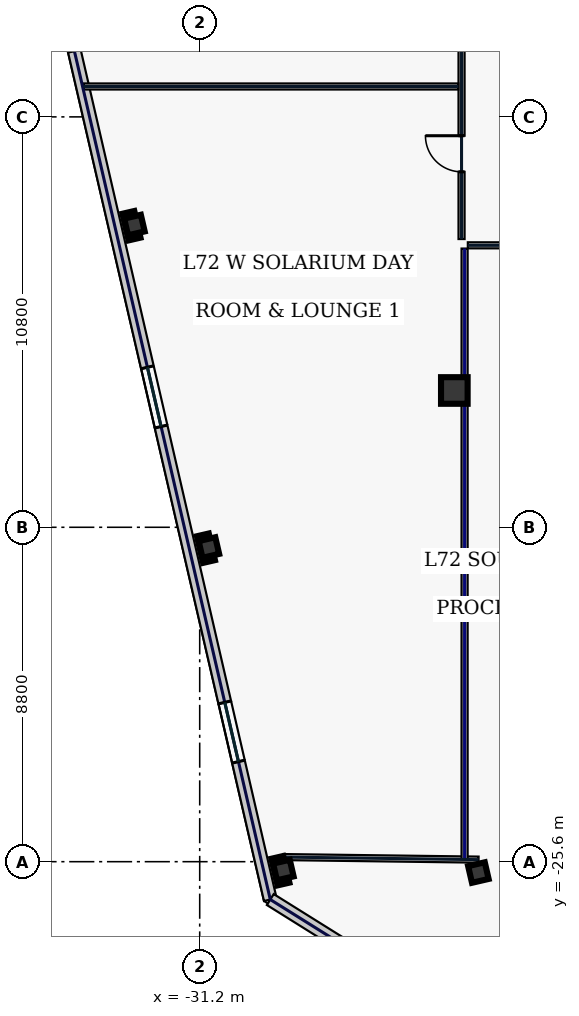
"""IFC4 building model, lengths in metres.
Left out: names, types, materials, properties, quantities, classifications, styles, units other than length and angle.
Written with IfcOpenShell. Run it as: python <this file> out.ifc"""

import sys

from ifc_helpers import new_model, si_unit, direction, frame, frame_2d, origin, origin_2d, place, context, subcontext, project, spatial, rectangle, hollow_rectangle, extrude, element, fill, save


model = new_model("IFC4")
c1 = context("Model", 3, precision=1e-05, world=origin(), true_north=direction((0.0, 1.0)))
c2 = subcontext(c1, "Body", "Model", "MODEL_VIEW")
j1 = project(units=[si_unit("LENGTHUNIT", "METRE"), si_unit("PLANEANGLEUNIT", "RADIAN")], contexts=[c1])
p1 = place(None, origin())
s1 = spatial("IfcSite", under=j1, at=p1, CompositionType="ELEMENT")
p2 = place(p1, origin())
s2 = spatial("IfcBuilding", under=s1, at=p2, CompositionType="ELEMENT")
p3 = place(p2, frame((0.0, 0.0, 309.0)))
s3 = spatial("IfcBuildingStorey", under=s2, at=p3, CompositionType="ELEMENT", Elevation=309.0)
p4 = place(p3, frame((-24.5, -13.2, 0.0), z_axis=(0.0, 0.0, 1.0), x_axis=(1.0, 0.0, 0.0)))
e1 = element("IfcColumn", 1, at=p4, inside=s3, PredefinedType="COLUMN", context=c2, shape_type="SweptSolid", body=[
    extrude(hollow_rectangle(XDim=0.7, YDim=0.7, WallThickness=0.032, at=origin_2d()), origin(), (0.0, 0.0, 1.0), 3.74),
])
for number, where, z_axis, x_axis in (
    (2, (-23.867, -25.886, 0.0), (0.0, 0.0, 1.0), (0.974, 0.225, 0.0)),
    (3, (-32.917, -8.845, 0.0), (0.0, 0.0, 1.0), (0.974, 0.225, 0.0)),
    (4, (-30.958, -17.332, 0.0), (0.0, 0.0, 1.0), (0.974, 0.225, 0.0)),
    (5, (-28.999, -25.819, 0.0), (0.0, 0.0, 1.0), (0.974, 0.225, 0.0)),
):
    element("IfcColumn", number, at=place(p3, frame(where, z_axis=z_axis, x_axis=x_axis)), inside=s3, PredefinedType="COLUMN", context=c2, shape_type="SweptSolid", body=[
        extrude(hollow_rectangle(XDim=0.45, YDim=0.45, WallThickness=0.022, at=origin_2d()), origin(), (0.0, 0.0, 1.0), 3.74),
    ])
p5 = place(p3, frame((-24.03, -29.916, 0.0), z_axis=(0.0, 0.0, 1.0), x_axis=(0.974370978061, 0.224947098473, 0.0)))
e6 = element("IfcWall", 6, at=p5, inside=s3, PredefinedType="STANDARD", context=c2, shape_type="SweptSolid", body=[
    extrude(rectangle(XDim=17.506, YDim=0.34, at=frame_2d((8.753, 0.0))), origin(), (0.0, 0.0, 1.0), 3.74),
])
p6 = place(p5, frame((2.35, 0.0, 0.9)))
e7 = element("IfcOpeningElement", 7, at=p6, cuts=e6, PredefinedType="OPENING", context=c2, shape_type="SweptSolid", body=[
    extrude(rectangle(XDim=1.5, YDim=2.0, at=frame_2d((0.75, 1.0))), frame((0.0, 0.18, 0.0), z_axis=(0.0, -1.0, 0.0), x_axis=(1.0, 0.0, 0.0)), (0.0, 0.0, 1.0), 0.36),
])
p7 = place(p5, frame((5.817, 0.0, 0.9)))
e8 = element("IfcOpeningElement", 8, at=p7, cuts=e6, PredefinedType="OPENING", context=c2, shape_type="SweptSolid", body=[
    extrude(rectangle(XDim=1.5, YDim=2.0, at=frame_2d((0.75, 1.0))), frame((0.0, 0.18, 0.0), z_axis=(0.0, -1.0, 0.0), x_axis=(1.0, 0.0, 0.0)), (0.0, 0.0, 1.0), 0.36),
])
p8 = place(p5, frame((13.353, 0.0, 0.9)))
e9 = element("IfcOpeningElement", 9, at=p8, cuts=e6, PredefinedType="OPENING", context=c2, shape_type="SweptSolid", body=[
    extrude(rectangle(XDim=0.85, YDim=1.85, at=frame_2d((0.425, 0.925))), frame((0.0, 0.18, 0.0), z_axis=(0.0, -1.0, 0.0), x_axis=(1.0, 0.0, 0.0)), (0.0, 0.0, 1.0), 0.36),
])
p9 = place(p3, frame((-37.486, 8.676, 0.0), z_axis=(0.0, 0.0, 1.0), x_axis=(0.224953091034, -0.974369594576, 0.0)))
e10 = element("IfcWall", 10, at=p9, inside=s3, PredefinedType="STANDARD", context=c2, shape_type="SweptSolid", body=[
    extrude(rectangle(XDim=36.2, YDim=0.34, at=frame_2d((18.1, 0.0))), origin(), (0.0, 0.0, 1.0), 3.74),
])
p10 = place(p9, frame((4.825, 0.0, 0.75)))
e11 = element("IfcOpeningElement", 11, at=p10, cuts=e10, PredefinedType="OPENING", context=c2, shape_type="SweptSolid", body=[
    extrude(rectangle(XDim=0.85, YDim=1.85, at=frame_2d((0.425, 0.925))), frame((0.0, 0.18, 0.0), z_axis=(0.0, -1.0, 0.0), x_axis=(1.0, 0.0, 0.0)), (0.0, 0.0, 1.0), 0.36),
])
p11 = place(p9, frame((12.425, 0.0, 0.75)))
e12 = element("IfcOpeningElement", 12, at=p11, cuts=e10, PredefinedType="OPENING", context=c2, shape_type="SweptSolid", body=[
    extrude(rectangle(XDim=0.85, YDim=1.85, at=frame_2d((0.425, 0.925))), frame((0.0, 0.18, 0.0), z_axis=(0.0, -1.0, 0.0), x_axis=(1.0, 0.0, 0.0)), (0.0, 0.0, 1.0), 0.36),
])
p12 = place(p9, frame((21.825, 0.0, 0.58)))
e13 = element("IfcOpeningElement", 13, at=p12, cuts=e10, PredefinedType="OPENING", context=c2, shape_type="SweptSolid", body=[
    extrude(rectangle(XDim=1.6, YDim=2.3, at=frame_2d((0.8, 1.15))), frame((0.0, 0.18, 0.0), z_axis=(0.0, -1.0, 0.0), x_axis=(1.0, 0.0, 0.0)), (0.0, 0.0, 1.0), 0.36),
])
p13 = place(p9, frame((30.875, 0.0, 0.58)))
e14 = element("IfcOpeningElement", 14, at=p13, cuts=e10, PredefinedType="OPENING", context=c2, shape_type="SweptSolid", body=[
    extrude(rectangle(XDim=1.6, YDim=2.3, at=frame_2d((0.8, 1.15))), frame((0.0, 0.18, 0.0), z_axis=(0.0, -1.0, 0.0), x_axis=(1.0, 0.0, 0.0)), (0.0, 0.0, 1.0), 0.36),
])
p14 = place(p3, frame((-29.343, -26.596, 0.0), z_axis=(0.0, 0.0, 1.0), x_axis=(0.848037708252, -0.529935887993, 0.0)))
e15 = element("IfcWall", 15, at=p14, inside=s3, PredefinedType="STANDARD", context=c2, shape_type="SweptSolid", body=[
    extrude(rectangle(XDim=6.265, YDim=0.34, at=frame_2d((3.133, 0.0))), origin(), (0.0, 0.0, 1.0), 3.74),
])
p15 = place(p3, frame((-28.994, -25.479, 0.0), z_axis=(0.0, 0.0, 1.0), x_axis=(0.999915052546, -0.01303409726, 0.0)))
e16 = element("IfcWall", 16, at=p15, inside=s3, PredefinedType="PARTITIONING", context=c2, shape_type="SweptSolid", body=[
    extrude(rectangle(XDim=5.132, YDim=0.16, at=frame_2d((2.566, 0.0))), origin(), (0.0, 0.0, 1.0), 3.74),
])
p16 = place(p3, frame((-24.31, -9.215, 0.0), z_axis=(0.0, 0.0, 1.0), x_axis=(0.0, 1.0, 0.0)))
e17 = element("IfcWall", 17, at=p16, inside=s3, PredefinedType="PARTITIONING", context=c2, shape_type="SweptSolid", body=[
    extrude(rectangle(XDim=18.63, YDim=0.16, at=frame_2d((9.315, 0.0))), origin(), (0.0, 0.0, 1.0), 3.74),
])
p17 = place(p16, frame((1.769, 0.0, 0.0)))
e18 = element("IfcOpeningElement", 18, at=p17, cuts=e17, PredefinedType="OPENING", context=c2, shape_type="SweptSolid", body=[
    extrude(rectangle(XDim=0.95, YDim=2.2, at=frame_2d((0.475, 1.1))), frame((0.0, 0.09, 0.0), z_axis=(0.0, -1.0, 0.0), x_axis=(1.0, 0.0, 0.0)), (0.0, 0.0, 1.0), 0.18),
])
p18 = place(p16, frame((6.85, 0.0, 0.0)))
e19 = element("IfcOpeningElement", 19, at=p18, cuts=e17, PredefinedType="OPENING", context=c2, shape_type="SweptSolid", body=[
    extrude(rectangle(XDim=0.95, YDim=2.2, at=frame_2d((0.475, 1.1))), frame((0.0, 0.09, 0.0), z_axis=(0.0, -1.0, 0.0), x_axis=(1.0, 0.0, 0.0)), (0.0, 0.0, 1.0), 0.18),
])
p19 = place(p16, frame((12.05, 0.0, 0.0)))
e20 = element("IfcOpeningElement", 20, at=p19, cuts=e17, PredefinedType="OPENING", context=c2, shape_type="SweptSolid", body=[
    extrude(rectangle(XDim=0.95, YDim=2.2, at=frame_2d((0.475, 1.1))), frame((0.0, 0.09, 0.0), z_axis=(0.0, -1.0, 0.0), x_axis=(1.0, 0.0, 0.0)), (0.0, 0.0, 1.0), 0.18),
])
p20 = place(p16, frame((15.981, 0.0, 0.0)))
e21 = element("IfcOpeningElement", 21, at=p20, cuts=e17, PredefinedType="OPENING", context=c2, shape_type="SweptSolid", body=[
    extrude(rectangle(XDim=0.95, YDim=2.2, at=frame_2d((0.475, 1.1))), frame((0.0, 0.09, 0.0), z_axis=(0.0, -1.0, 0.0), x_axis=(1.0, 0.0, 0.0)), (0.0, 0.0, 1.0), 0.18),
])
p21 = place(p3, frame((12.535, -9.38, 0.0), z_axis=(0.0, 0.0, 1.0), x_axis=(-1.0, 0.0, 0.0)))
e22 = element("IfcWall", 22, at=p21, inside=s3, PredefinedType="PARTITIONING", context=c2, shape_type="SweptSolid", body=[
    extrude(rectangle(XDim=36.68, YDim=0.16, at=frame_2d((18.34, 0.0))), origin(), (0.0, 0.0, 1.0), 3.74),
])
p22 = place(p21, frame((33.856, 0.0, 0.0)))
e23 = element("IfcOpeningElement", 23, at=p22, cuts=e22, PredefinedType="OPENING", context=c2, shape_type="SweptSolid", body=[
    extrude(rectangle(XDim=1.05, YDim=2.2, at=frame_2d((0.525, 1.1))), frame((0.0, 0.09, 0.0), z_axis=(0.0, -1.0, 0.0), x_axis=(1.0, 0.0, 0.0)), (0.0, 0.0, 1.0), 0.18),
])
p23 = place(p21, frame((28.88, 0.0, 0.0)))
e24 = element("IfcOpeningElement", 24, at=p23, cuts=e22, PredefinedType="OPENING", context=c2, shape_type="SweptSolid", body=[
    extrude(rectangle(XDim=1.15, YDim=2.2, at=frame_2d((0.575, 1.1))), frame((0.0, 0.09, 0.0), z_axis=(0.0, -1.0, 0.0), x_axis=(1.0, 0.0, 0.0)), (0.0, 0.0, 1.0), 0.18),
])
p24 = place(p21, frame((23.64, 0.0, 0.0)))
e25 = element("IfcOpeningElement", 25, at=p24, cuts=e22, PredefinedType="OPENING", context=c2, shape_type="SweptSolid", body=[
    extrude(rectangle(XDim=0.95, YDim=2.2, at=frame_2d((0.475, 1.1))), frame((0.0, 0.09, 0.0), z_axis=(0.0, -1.0, 0.0), x_axis=(1.0, 0.0, 0.0)), (0.0, 0.0, 1.0), 0.18),
])
p25 = place(p21, frame((18.395, 0.0, 0.0)))
e26 = element("IfcOpeningElement", 26, at=p25, cuts=e22, PredefinedType="OPENING", context=c2, shape_type="SweptSolid", body=[
    extrude(rectangle(XDim=0.95, YDim=2.2, at=frame_2d((0.475, 1.1))), frame((0.0, 0.09, 0.0), z_axis=(0.0, -1.0, 0.0), x_axis=(1.0, 0.0, 0.0)), (0.0, 0.0, 1.0), 0.18),
])
p26 = place(p21, frame((12.97, 0.0, 0.0)))
e27 = element("IfcOpeningElement", 27, at=p26, cuts=e22, PredefinedType="OPENING", context=c2, shape_type="SweptSolid", body=[
    extrude(rectangle(XDim=1.3, YDim=2.2, at=frame_2d((0.65, 1.1))), frame((0.0, 0.09, 0.0), z_axis=(0.0, -1.0, 0.0), x_axis=(1.0, 0.0, 0.0)), (0.0, 0.0, 1.0), 0.18),
])
p27 = place(p21, frame((5.32, 0.0, 0.0)))
e28 = element("IfcOpeningElement", 28, at=p27, cuts=e22, PredefinedType="OPENING", context=c2, shape_type="SweptSolid", body=[
    extrude(rectangle(XDim=1.3, YDim=2.2, at=frame_2d((0.65, 1.1))), frame((0.0, 0.09, 0.0), z_axis=(0.0, -1.0, 0.0), x_axis=(1.0, 0.0, 0.0)), (0.0, 0.0, 1.0), 0.18),
])
p28 = place(p3, frame((-24.23, -25.536, 0.0), z_axis=(0.0, 0.0, 1.0), x_axis=(0.0, 1.0, 0.0)))
e29 = element("IfcWall", 29, at=p28, inside=s3, PredefinedType="PARTITIONING", context=c2, shape_type="SweptSolid", body=[
    extrude(rectangle(XDim=16.071, YDim=0.16, at=frame_2d((8.035, 0.0))), origin(), (0.0, 0.0, 1.0), 3.335),
])
p29 = place(p3, frame((-34.262, -5.2, 0.0), z_axis=(0.0, 0.0, 1.0), x_axis=(1.0, 0.0, 0.0)))
e30 = element("IfcWall", 30, at=p29, inside=s3, PredefinedType="PARTITIONING", context=c2, shape_type="SweptSolid", body=[
    extrude(rectangle(XDim=9.867, YDim=0.16, at=frame_2d((4.933, 0.0))), origin(), (0.0, 0.0, 1.0), 3.74),
])
p30 = place(p12, origin())
e31 = element("IfcWindow", 31, at=p30, inside=s3, PartitioningType="SINGLE_PANEL", PredefinedType="WINDOW", context=c2, shape_type="SweptSolid", body=[
    extrude(rectangle(XDim=1.6, YDim=2.3, at=frame_2d((0.8, 1.15))), frame((0.0, 0.03, 0.0), z_axis=(0.0, -1.0, 0.0), x_axis=(1.0, 0.0, 0.0)), (0.0, 0.0, 1.0), 0.06),
])
fill(e13, e31)
p31 = place(p13, origin())
e32 = element("IfcWindow", 32, at=p31, inside=s3, PartitioningType="SINGLE_PANEL", PredefinedType="WINDOW", context=c2, shape_type="SweptSolid", body=[
    extrude(rectangle(XDim=1.6, YDim=2.3, at=frame_2d((0.8, 1.15))), frame((0.0, 0.03, 0.0), z_axis=(0.0, -1.0, 0.0), x_axis=(1.0, 0.0, 0.0)), (0.0, 0.0, 1.0), 0.06),
])
fill(e14, e32)
p32 = place(p17, origin())
e33 = element("IfcDoor", 33, at=p32, inside=s3, OperationType="SINGLE_SWING_RIGHT", PredefinedType="DOOR", context=c2, shape_type="SweptSolid", body=[
    extrude(rectangle(XDim=0.95, YDim=2.2, at=frame_2d((0.475, 1.1))), frame((0.0, 0.025, 0.0), z_axis=(0.0, -1.0, 0.0), x_axis=(1.0, 0.0, 0.0)), (0.0, 0.0, 1.0), 0.05),
])
fill(e18, e33)
save(model, sys.argv[1])
